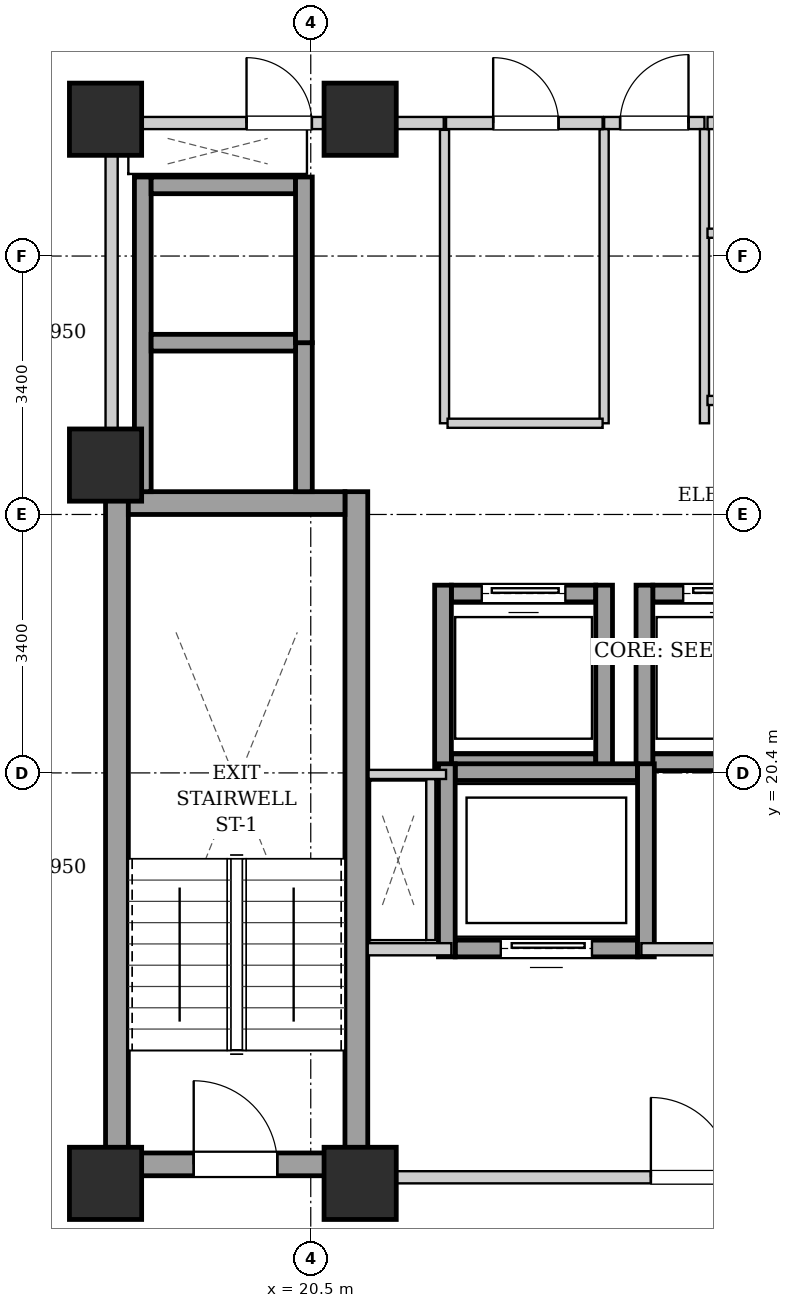
"""IFC4 building model, lengths in metres.
Left out: names, types, materials, properties, quantities, classifications, styles, units other than length and angle.
Written with IfcOpenShell. Run it as: python <this file> out.ifc"""

import sys

from ifc_helpers import new_model, si_unit, direction, frame, frame_2d, origin, origin_2d, place, context, subcontext, project, spatial, rectangle, extrude, element, fill, save


model = new_model("IFC4")
c1 = context("Model", 3, precision=1e-05, world=origin(), true_north=direction((0.0, 1.0)))
c2 = subcontext(c1, "Body", "Model", "MODEL_VIEW")
j1 = project(units=[si_unit("LENGTHUNIT", "METRE"), si_unit("PLANEANGLEUNIT", "RADIAN")], contexts=[c1])
p1 = place(None, origin())
s1 = spatial("IfcSite", under=j1, at=p1, CompositionType="ELEMENT")
p2 = place(p1, origin())
s2 = spatial("IfcBuilding", under=s1, at=p2, CompositionType="ELEMENT")
p3 = place(p2, frame((0.0, 0.0, 140.65)))
s3 = spatial("IfcBuildingStorey", under=s2, at=p3, CompositionType="ELEMENT", Elevation=140.65)
for number, where, z_axis, x_axis in (
    (1, (17.8, 15.0, 0.0), (0.0, 0.0, 1.0), (1.0, 0.0, 0.0)),
    (2, (21.15, 15.0, 0.0), (0.0, 0.0, 1.0), (1.0, 0.0, 0.0)),
    (3, (17.8, 29.0, 0.0), (0.0, 0.0, 1.0), (1.0, 0.0, 0.0)),
    (4, (21.15, 29.0, 0.0), (0.0, 0.0, 1.0), (1.0, 0.0, 0.0)),
    (5, (17.8, 24.45, 0.0), (0.0, 0.0, 1.0), (1.0, 0.0, 0.0)),
):
    element("IfcColumn", number, at=place(p3, frame(where, z_axis=z_axis, x_axis=x_axis)), inside=s3, PredefinedType="COLUMN", context=c2, shape_type="SweptSolid", body=[
        extrude(rectangle(XDim=0.95, YDim=0.95, at=origin_2d()), origin(), (0.0, 0.0, 1.0), 3.25),
    ])
for number, where, z_axis, x_axis in (
    (6, (17.95, 15.1, 0.0), (0.0, 0.0, 1.0), (0.0, 1.0, 0.0)),
    (7, (21.1, 15.1, 0.0), (0.0, 0.0, 1.0), (0.0, 1.0, 0.0)),
):
    element("IfcWall", number, at=place(p3, frame(where, z_axis=z_axis, x_axis=x_axis)), inside=s3, PredefinedType="SHEAR", context=c2, shape_type="SweptSolid", body=[
        extrude(rectangle(XDim=9.0, YDim=0.3, at=frame_2d((4.5, 0.0))), origin(), (0.0, 0.0, 1.0), 2.99),
    ])
p4 = place(p3, frame((18.1, 23.95, 0.0), z_axis=(0.0, 0.0, 1.0), x_axis=(1.0, 0.0, 0.0)))
e8 = element("IfcWall", 8, at=p4, inside=s3, PredefinedType="SHEAR", context=c2, shape_type="SweptSolid", body=[
    extrude(rectangle(XDim=2.85, YDim=0.3, at=frame_2d((1.425, 0.0))), origin(), (0.0, 0.0, 1.0), 2.99),
])
p5 = place(p3, frame((18.1, 15.25, 0.0), z_axis=(0.0, 0.0, 1.0), x_axis=(1.0, 0.0, 0.0)))
e9 = element("IfcWall", 9, at=p5, inside=s3, PredefinedType="SHEAR", context=c2, shape_type="SweptSolid", body=[
    extrude(rectangle(XDim=2.85, YDim=0.3, at=frame_2d((1.425, 0.0))), origin(), (0.0, 0.0, 1.0), 2.99),
])
p6 = place(p5, frame((0.86, 0.0, 0.0)))
e10 = element("IfcOpeningElement", 10, at=p6, cuts=e9, PredefinedType="OPENING", context=c2, shape_type="SweptSolid", body=[
    extrude(rectangle(XDim=1.1, YDim=2.05, at=frame_2d((0.55, 1.025))), frame((0.0, 0.16, 0.0), z_axis=(0.0, -1.0, 0.0), x_axis=(1.0, 0.0, 0.0)), (0.0, 0.0, 1.0), 0.32),
])
p7 = place(p3, frame((22.35, 20.54, 0.0), z_axis=(0.0, 0.0, 1.0), x_axis=(1.0, 0.0, 0.0)))
e11 = element("IfcWall", 11, at=p7, inside=s3, PredefinedType="SHEAR", context=c2, shape_type="SweptSolid", body=[
    extrude(rectangle(XDim=1.9, YDim=0.22, at=frame_2d((0.95, 0.0))), origin(), (0.0, 0.0, 1.0), 2.99),
])
p8 = place(p3, frame((22.35, 22.76, 0.0), z_axis=(0.0, 0.0, 1.0), x_axis=(1.0, 0.0, 0.0)))
e12 = element("IfcWall", 12, at=p8, inside=s3, PredefinedType="SHEAR", context=c2, shape_type="SweptSolid", body=[
    extrude(rectangle(XDim=1.9, YDim=0.22, at=frame_2d((0.95, 0.0))), origin(), (0.0, 0.0, 1.0), 2.99),
])
p9 = place(p8, frame((0.4, 0.0, 0.0)))
e13 = element("IfcOpeningElement", 13, at=p9, cuts=e12, PredefinedType="OPENING", context=c2, shape_type="SweptSolid", body=[
    extrude(rectangle(XDim=1.1, YDim=2.15, at=frame_2d((0.55, 1.075))), frame((0.0, 0.12, 0.0), z_axis=(0.0, -1.0, 0.0), x_axis=(1.0, 0.0, 0.0)), (0.0, 0.0, 1.0), 0.24),
])
for number, where, z_axis, x_axis in (
    (14, (22.24, 20.43, 0.0), (0.0, 0.0, 1.0), (0.0, 1.0, 0.0)),
    (15, (24.36, 20.43, 0.0), (0.0, 0.0, 1.0), (0.0, 1.0, 0.0)),
):
    element("IfcWall", number, at=place(p3, frame(where, z_axis=z_axis, x_axis=x_axis)), inside=s3, PredefinedType="SHEAR", context=c2, shape_type="SweptSolid", body=[
        extrude(rectangle(XDim=2.44, YDim=0.22, at=frame_2d((1.22, 0.0))), origin(), (0.0, 0.0, 1.0), 2.99),
    ])
p10 = place(p3, frame((25.0, 20.54, 0.0), z_axis=(0.0, 0.0, 1.0), x_axis=(1.0, 0.0, 0.0)))
e16 = element("IfcWall", 16, at=p10, inside=s3, PredefinedType="SHEAR", context=c2, shape_type="SweptSolid", body=[
    extrude(rectangle(XDim=1.9, YDim=0.22, at=frame_2d((0.95, 0.0))), origin(), (0.0, 0.0, 1.0), 2.99),
])
p11 = place(p3, frame((25.0, 22.76, 0.0), z_axis=(0.0, 0.0, 1.0), x_axis=(1.0, 0.0, 0.0)))
e17 = element("IfcWall", 17, at=p11, inside=s3, PredefinedType="SHEAR", context=c2, shape_type="SweptSolid", body=[
    extrude(rectangle(XDim=1.9, YDim=0.22, at=frame_2d((0.95, 0.0))), origin(), (0.0, 0.0, 1.0), 2.99),
])
p12 = place(p11, frame((0.4, 0.0, 0.0)))
e18 = element("IfcOpeningElement", 18, at=p12, cuts=e17, PredefinedType="OPENING", context=c2, shape_type="SweptSolid", body=[
    extrude(rectangle(XDim=1.1, YDim=2.15, at=frame_2d((0.55, 1.075))), frame((0.0, 0.12, 0.0), z_axis=(0.0, -1.0, 0.0), x_axis=(1.0, 0.0, 0.0)), (0.0, 0.0, 1.0), 0.24),
])
p13 = place(p3, frame((24.89, 20.43, 0.0), z_axis=(0.0, 0.0, 1.0), x_axis=(0.0, 1.0, 0.0)))
e19 = element("IfcWall", 19, at=p13, inside=s3, PredefinedType="SHEAR", context=c2, shape_type="SweptSolid", body=[
    extrude(rectangle(XDim=2.44, YDim=0.22, at=frame_2d((1.22, 0.0))), origin(), (0.0, 0.0, 1.0), 2.99),
])
p14 = place(p3, frame((18.29, 24.1, 0.0), z_axis=(0.0, 0.0, 1.0), x_axis=(0.0, 1.0, 0.0)))
e20 = element("IfcWall", 20, at=p14, inside=s3, PredefinedType="SHEAR", context=c2, shape_type="SweptSolid", body=[
    extrude(rectangle(XDim=4.14, YDim=0.22, at=frame_2d((2.07, 0.0))), origin(), (0.0, 0.0, 1.0), 2.99),
])
p15 = place(p3, frame((20.41, 24.1, 0.0), z_axis=(0.0, 0.0, 1.0), x_axis=(0.0, 1.0, 0.0)))
e21 = element("IfcWall", 21, at=p15, inside=s3, PredefinedType="SHEAR", context=c2, shape_type="SweptSolid", body=[
    extrude(rectangle(XDim=1.96, YDim=0.22, at=frame_2d((0.98, 0.0))), origin(), (0.0, 0.0, 1.0), 2.99),
])
for number, where, z_axis, x_axis in (
    (22, (18.4, 26.06, 0.0), (0.0, 0.0, 1.0), (1.0, 0.0, 0.0)),
    (23, (18.4, 28.13, 0.0), (0.0, 0.0, 1.0), (1.0, 0.0, 0.0)),
):
    element("IfcWall", number, at=place(p3, frame(where, z_axis=z_axis, x_axis=x_axis)), inside=s3, PredefinedType="SHEAR", context=c2, shape_type="SweptSolid", body=[
        extrude(rectangle(XDim=1.9, YDim=0.22, at=frame_2d((0.95, 0.0))), origin(), (0.0, 0.0, 1.0), 2.99),
    ])
p16 = place(p3, frame((20.41, 26.06, 0.0), z_axis=(0.0, 0.0, 1.0), x_axis=(0.0, 1.0, 0.0)))
e24 = element("IfcWall", 24, at=p16, inside=s3, PredefinedType="SHEAR", context=c2, shape_type="SweptSolid", body=[
    extrude(rectangle(XDim=2.18, YDim=0.22, at=frame_2d((1.09, 0.0))), origin(), (0.0, 0.0, 1.0), 2.99),
])
p17 = place(p3, frame((22.4, 18.09, 0.0), z_axis=(0.0, 0.0, 1.0), x_axis=(1.0, 0.0, 0.0)))
e25 = element("IfcWall", 25, at=p17, inside=s3, PredefinedType="SHEAR", context=c2, shape_type="SweptSolid", body=[
    extrude(rectangle(XDim=2.4, YDim=0.22, at=frame_2d((1.2, 0.0))), origin(), (0.0, 0.0, 1.0), 2.99),
])
p18 = place(p17, frame((0.6, 0.0, 0.0)))
e26 = element("IfcOpeningElement", 26, at=p18, cuts=e25, PredefinedType="OPENING", context=c2, shape_type="SweptSolid", body=[
    extrude(rectangle(XDim=1.2, YDim=2.15, at=frame_2d((0.6, 1.075))), frame((0.0, 0.12, 0.0), z_axis=(0.0, -1.0, 0.0), x_axis=(1.0, 0.0, 0.0)), (0.0, 0.0, 1.0), 0.24),
])
p19 = place(p3, frame((22.4, 20.41, 0.0), z_axis=(0.0, 0.0, 1.0), x_axis=(1.0, 0.0, 0.0)))
e27 = element("IfcWall", 27, at=p19, inside=s3, PredefinedType="SHEAR", context=c2, shape_type="SweptSolid", body=[
    extrude(rectangle(XDim=2.4, YDim=0.22, at=frame_2d((1.2, 0.0))), origin(), (0.0, 0.0, 1.0), 2.99),
])
for number, where, z_axis, x_axis in (
    (28, (22.29, 17.98, 0.0), (0.0, 0.0, 1.0), (0.0, 1.0, 0.0)),
    (29, (24.91, 17.98, 0.0), (0.0, 0.0, 1.0), (0.0, 1.0, 0.0)),
):
    element("IfcWall", number, at=place(p3, frame(where, z_axis=z_axis, x_axis=x_axis)), inside=s3, PredefinedType="SHEAR", context=c2, shape_type="SweptSolid", body=[
        extrude(rectangle(XDim=2.54, YDim=0.22, at=frame_2d((1.27, 0.0))), origin(), (0.0, 0.0, 1.0), 2.99),
    ])
p20 = place(p3, frame((21.25, 15.08, 0.0), z_axis=(0.0, 0.0, 1.0), x_axis=(1.0, 0.0, 0.0)))
e30 = element("IfcWall", 30, at=p20, inside=s3, PredefinedType="PARTITIONING", context=c2, shape_type="SweptSolid", body=[
    extrude(rectangle(XDim=8.5, YDim=0.16, at=frame_2d((4.25, 0.0))), origin(), (0.0, 0.0, 1.0), 2.426),
])
p21 = place(p20, frame((3.725, 0.0, 0.0)))
e31 = element("IfcOpeningElement", 31, at=p21, cuts=e30, PredefinedType="OPENING", context=c2, shape_type="SweptSolid", body=[
    extrude(rectangle(XDim=1.05, YDim=2.05, at=frame_2d((0.525, 1.025))), frame((0.0, 0.09, 0.0), z_axis=(0.0, -1.0, 0.0), x_axis=(1.0, 0.0, 0.0)), (0.0, 0.0, 1.0), 0.18),
])
p22 = place(p3, frame((21.25, 18.08, 0.0), z_axis=(0.0, 0.0, 1.0), x_axis=(1.0, 0.0, 0.0)))
e32 = element("IfcWall", 32, at=p22, inside=s3, PredefinedType="PARTITIONING", context=c2, shape_type="SweptSolid", body=[
    extrude(rectangle(XDim=1.1, YDim=0.16, at=frame_2d((0.55, 0.0))), origin(), (0.0, 0.0, 1.0), 2.99),
])
p23 = place(p3, frame((24.85, 18.08, 0.0), z_axis=(0.0, 0.0, 1.0), x_axis=(1.0, 0.0, 0.0)))
e33 = element("IfcWall", 33, at=p23, inside=s3, PredefinedType="PARTITIONING", context=c2, shape_type="SweptSolid", body=[
    extrude(rectangle(XDim=1.3, YDim=0.16, at=frame_2d((0.65, 0.0))), origin(), (0.0, 0.0, 1.0), 2.99),
])
p24 = place(p3, frame((17.88, 24.12, 0.0), z_axis=(0.0, 0.0, 1.0), x_axis=(0.0, 1.0, 0.0)))
e34 = element("IfcWall", 34, at=p24, inside=s3, PredefinedType="PARTITIONING", context=c2, shape_type="SweptSolid", body=[
    extrude(rectangle(XDim=4.76, YDim=0.16, at=frame_2d((2.38, 0.0))), origin(), (0.0, 0.0, 1.0), 2.99),
])
p25 = place(p3, frame((24.36, 28.95, 0.0), z_axis=(0.0, 0.0, 1.0), x_axis=(1.0, 0.0, 0.0)))
e35 = element("IfcWall", 35, at=p25, inside=s3, PredefinedType="PARTITIONING", context=c2, shape_type="SweptSolid", body=[
    extrude(rectangle(XDim=1.32, YDim=0.16, at=frame_2d((0.66, 0.0))), origin(), (0.0, 0.0, 1.0), 2.426),
])
p26 = place(p25, frame((0.21, 0.0, 0.0)))
e36 = element("IfcOpeningElement", 36, at=p26, cuts=e35, PredefinedType="OPENING", context=c2, shape_type="SweptSolid", body=[
    extrude(rectangle(XDim=0.9, YDim=2.05, at=frame_2d((0.45, 1.025))), frame((0.0, 0.09, 0.0), z_axis=(0.0, -1.0, 0.0), x_axis=(1.0, 0.0, 0.0)), (0.0, 0.0, 1.0), 0.18),
])
p27 = place(p3, frame((17.96, 28.95, 0.0), z_axis=(0.0, 0.0, 1.0), x_axis=(1.0, 0.0, 0.0)))
e37 = element("IfcWall", 37, at=p27, inside=s3, PredefinedType="PARTITIONING", context=c2, shape_type="SweptSolid", body=[
    extrude(rectangle(XDim=4.29, YDim=0.16, at=frame_2d((2.145, 0.0))), origin(), (0.0, 0.0, 1.0), 2.426),
])
p28 = place(p27, frame((1.695, 0.0, 0.0)))
e38 = element("IfcOpeningElement", 38, at=p28, cuts=e37, PredefinedType="OPENING", context=c2, shape_type="SweptSolid", body=[
    extrude(rectangle(XDim=0.86, YDim=2.05, at=frame_2d((0.43, 1.025))), frame((0.0, 0.09, 0.0), z_axis=(0.0, -1.0, 0.0), x_axis=(1.0, 0.0, 0.0)), (0.0, 0.0, 1.0), 0.18),
])
p29 = place(p3, frame((22.08, 18.2, 0.0), z_axis=(0.0, 0.0, 1.0), x_axis=(0.0, 1.0, 0.0)))
e39 = element("IfcWall", 39, at=p29, inside=s3, PredefinedType="PARTITIONING", context=c2, shape_type="SweptSolid", body=[
    extrude(rectangle(XDim=2.12, YDim=0.12, at=frame_2d((1.06, 0.0))), origin(), (0.0, 0.0, 1.0), 2.99),
])
p30 = place(p3, frame((22.28, 20.38, 0.0), z_axis=(0.0, 0.0, 1.0), x_axis=(-1.0, 0.0, 0.0)))
e40 = element("IfcWall", 40, at=p30, inside=s3, PredefinedType="PARTITIONING", context=c2, shape_type="SweptSolid", body=[
    extrude(rectangle(XDim=1.02, YDim=0.12, at=frame_2d((0.51, 0.0))), origin(), (0.0, 0.0, 1.0), 2.99),
])
for number, where, z_axis, x_axis in (
    (41, (24.36, 25.0, 0.0), (0.0, 0.0, 1.0), (0.0, 1.0, 0.0)),
    (42, (25.68, 25.0, 0.0), (0.0, 0.0, 1.0), (0.0, 1.0, 0.0)),
):
    element("IfcWall", number, at=place(p3, frame(where, z_axis=z_axis, x_axis=x_axis)), inside=s3, PredefinedType="PARTITIONING", context=c2, shape_type="SweptSolid", body=[
        extrude(rectangle(XDim=3.87, YDim=0.12, at=frame_2d((1.935, 0.0))), origin(), (0.0, 0.0, 1.0), 2.99),
    ])
p31 = place(p3, frame((22.26, 25.0, 0.0), z_axis=(0.0, 0.0, 1.0), x_axis=(0.0, 1.0, 0.0)))
e43 = element("IfcWall", 43, at=p31, inside=s3, PredefinedType="PARTITIONING", context=c2, shape_type="SweptSolid", body=[
    extrude(rectangle(XDim=3.86, YDim=0.12, at=frame_2d((1.93, 0.0))), origin(), (0.0, 0.0, 1.0), 2.99),
])
p32 = place(p3, frame((22.3, 25.0, 0.0), z_axis=(0.0, 0.0, 1.0), x_axis=(1.0, 0.0, 0.0)))
e44 = element("IfcWall", 44, at=p32, inside=s3, PredefinedType="PARTITIONING", context=c2, shape_type="SweptSolid", body=[
    extrude(rectangle(XDim=2.04, YDim=0.12, at=frame_2d((1.02, 0.0))), origin(), (0.0, 0.0, 1.0), 2.99),
])
p33 = place(p3, frame((22.28, 28.95, 0.0), z_axis=(0.0, 0.0, 1.0), x_axis=(1.0, 0.0, 0.0)))
e45 = element("IfcWall", 45, at=p33, inside=s3, PredefinedType="PARTITIONING", context=c2, shape_type="SweptSolid", body=[
    extrude(rectangle(XDim=2.06, YDim=0.16, at=frame_2d((1.03, 0.0))), origin(), (0.0, 0.0, 1.0), 2.426),
])
p34 = place(p33, frame((0.62, 0.0, 0.0)))
e46 = element("IfcOpeningElement", 46, at=p34, cuts=e45, PredefinedType="OPENING", context=c2, shape_type="SweptSolid", body=[
    extrude(rectangle(XDim=0.86, YDim=2.05, at=frame_2d((0.43, 1.025))), frame((0.0, 0.09, 0.0), z_axis=(0.0, -1.0, 0.0), x_axis=(1.0, 0.0, 0.0)), (0.0, 0.0, 1.0), 0.18),
])
p35 = place(p3, frame((25.72, 27.5, 0.0), z_axis=(0.0, 0.0, 1.0), x_axis=(1.0, 0.0, 0.0)))
e47 = element("IfcWall", 47, at=p35, inside=s3, PredefinedType="PARTITIONING", context=c2, shape_type="SweptSolid", body=[
    extrude(rectangle(XDim=4.36, YDim=0.12, at=frame_2d((2.18, 0.0))), origin(), (0.0, 0.0, 1.0), 2.99),
])
p36 = place(p3, frame((25.72, 25.3, 0.0), z_axis=(0.0, 0.0, 1.0), x_axis=(1.0, 0.0, 0.0)))
e48 = element("IfcWall", 48, at=p36, inside=s3, PredefinedType="PARTITIONING", context=c2, shape_type="SweptSolid", body=[
    extrude(rectangle(XDim=4.32, YDim=0.12, at=frame_2d((2.16, 0.0))), origin(), (0.0, 0.0, 1.0), 2.99),
])
p37 = place(p36, frame((1.65, 0.0, 0.0)))
e49 = element("IfcOpeningElement", 49, at=p37, cuts=e48, PredefinedType="OPENING", context=c2, shape_type="SweptSolid", body=[
    extrude(rectangle(XDim=0.9, YDim=2.05, at=frame_2d((0.45, 1.025))), frame((0.0, 0.07, 0.0), z_axis=(0.0, -1.0, 0.0), x_axis=(1.0, 0.0, 0.0)), (0.0, 0.0, 1.0), 0.14),
])
p38 = place(p3, frame((25.72, 28.95, 0.0), z_axis=(0.0, 0.0, 1.0), x_axis=(1.0, 0.0, 0.0)))
e50 = element("IfcWall", 50, at=p38, inside=s3, PredefinedType="PARTITIONING", context=c2, shape_type="SweptSolid", body=[
    extrude(rectangle(XDim=7.32, YDim=0.16, at=frame_2d((3.66, 0.0))), origin(), (0.0, 0.0, 1.0), 2.426),
])
p39 = place(p38, frame((1.27, 0.0, 0.0)))
e51 = element("IfcOpeningElement", 51, at=p39, cuts=e50, PredefinedType="OPENING", context=c2, shape_type="SweptSolid", body=[
    extrude(rectangle(XDim=0.86, YDim=2.05, at=frame_2d((0.43, 1.025))), frame((0.0, 0.09, 0.0), z_axis=(0.0, -1.0, 0.0), x_axis=(1.0, 0.0, 0.0)), (0.0, 0.0, 1.0), 0.18),
])
p40 = place(p6, origin())
e52 = element("IfcDoor", 52, at=p40, inside=s3, OperationType="SINGLE_SWING_LEFT", PredefinedType="DOOR", context=c2, shape_type="SweptSolid", body=[
    extrude(rectangle(XDim=1.1, YDim=2.05, at=frame_2d((0.55, 1.025))), frame((0.0, 0.025, 0.0), z_axis=(0.0, -1.0, 0.0), x_axis=(1.0, 0.0, 0.0)), (0.0, 0.0, 1.0), 0.05),
])
fill(e10, e52)
p41 = place(p9, origin())
e53 = element("IfcDoor", 53, at=p41, inside=s3, OperationType="SLIDING_TO_LEFT", PredefinedType="DOOR", context=c2, shape_type="SweptSolid", body=[
    extrude(rectangle(XDim=1.1, YDim=2.15, at=frame_2d((0.55, 1.075))), frame((0.0, 0.025, 0.0), z_axis=(0.0, -1.0, 0.0), x_axis=(1.0, 0.0, 0.0)), (0.0, 0.0, 1.0), 0.05),
])
fill(e13, e53)
p42 = place(p12, origin())
e54 = element("IfcDoor", 54, at=p42, inside=s3, OperationType="SLIDING_TO_LEFT", PredefinedType="DOOR", context=c2, shape_type="SweptSolid", body=[
    extrude(rectangle(XDim=1.1, YDim=2.15, at=frame_2d((0.55, 1.075))), frame((0.0, 0.025, 0.0), z_axis=(0.0, -1.0, 0.0), x_axis=(1.0, 0.0, 0.0)), (0.0, 0.0, 1.0), 0.05),
])
fill(e18, e54)
p43 = place(p18, origin())
e55 = element("IfcDoor", 55, at=p43, inside=s3, OperationType="SLIDING_TO_LEFT", PredefinedType="DOOR", context=c2, shape_type="SweptSolid", body=[
    extrude(rectangle(XDim=1.2, YDim=2.15, at=frame_2d((0.6, 1.075))), frame((0.0, 0.025, 0.0), z_axis=(0.0, -1.0, 0.0), x_axis=(1.0, 0.0, 0.0)), (0.0, 0.0, 1.0), 0.05),
])
fill(e26, e55)
p44 = place(p21, origin())
e56 = element("IfcDoor", 56, at=p44, inside=s3, OperationType="SINGLE_SWING_LEFT", PredefinedType="DOOR", context=c2, shape_type="SweptSolid", body=[
    extrude(rectangle(XDim=1.05, YDim=2.05, at=frame_2d((0.525, 1.025))), frame((0.0, 0.025, 0.0), z_axis=(0.0, -1.0, 0.0), x_axis=(1.0, 0.0, 0.0)), (0.0, 0.0, 1.0), 0.05),
])
fill(e31, e56)
p45 = place(p26, origin())
e57 = element("IfcDoor", 57, at=p45, inside=s3, OperationType="SINGLE_SWING_RIGHT", PredefinedType="DOOR", context=c2, shape_type="SweptSolid", body=[
    extrude(rectangle(XDim=0.9, YDim=2.05, at=frame_2d((0.45, 1.025))), frame((0.0, 0.025, 0.0), z_axis=(0.0, -1.0, 0.0), x_axis=(1.0, 0.0, 0.0)), (0.0, 0.0, 1.0), 0.05),
])
fill(e36, e57)
p46 = place(p28, origin())
e58 = element("IfcDoor", 58, at=p46, inside=s3, OperationType="SINGLE_SWING_LEFT", PredefinedType="DOOR", context=c2, shape_type="SweptSolid", body=[
    extrude(rectangle(XDim=0.86, YDim=2.05, at=frame_2d((0.43, 1.025))), frame((0.0, 0.025, 0.0), z_axis=(0.0, -1.0, 0.0), x_axis=(1.0, 0.0, 0.0)), (0.0, 0.0, 1.0), 0.05),
])
fill(e38, e58)
p47 = place(p34, origin())
e59 = element("IfcDoor", 59, at=p47, inside=s3, OperationType="SINGLE_SWING_LEFT", PredefinedType="DOOR", context=c2, shape_type="SweptSolid", body=[
    extrude(rectangle(XDim=0.86, YDim=2.05, at=frame_2d((0.43, 1.025))), frame((0.0, 0.025, 0.0), z_axis=(0.0, -1.0, 0.0), x_axis=(1.0, 0.0, 0.0)), (0.0, 0.0, 1.0), 0.05),
])
fill(e46, e59)
save(model, sys.argv[1])
